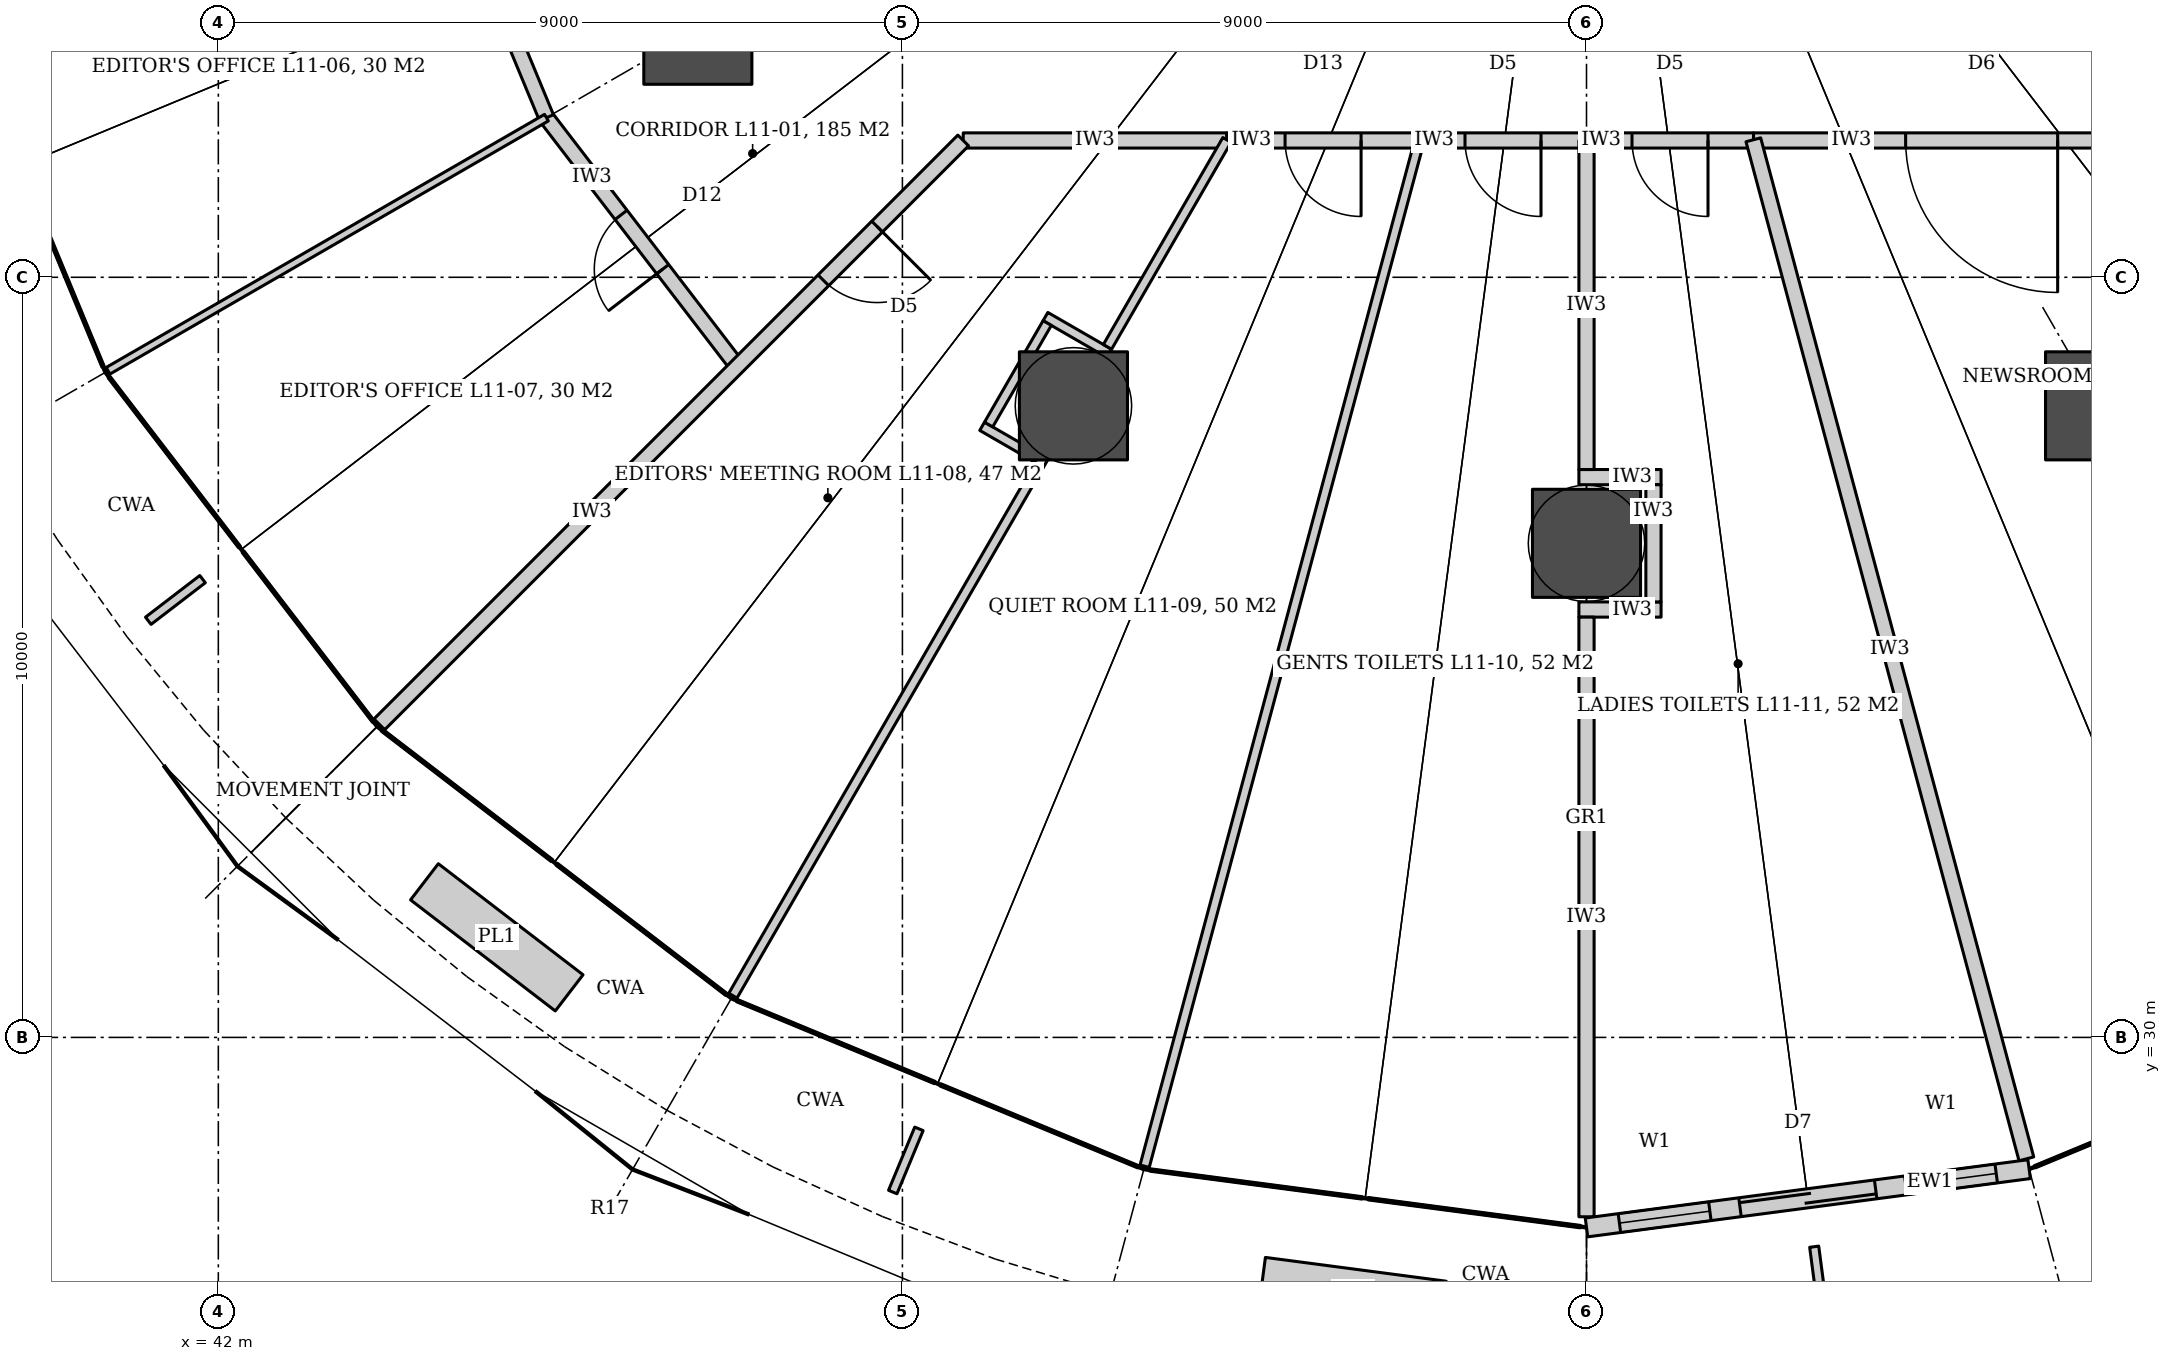
"""IFC4 building model, lengths in metres.
Left out: names, types, materials, properties, quantities, classifications, styles, units other than length and angle.
Written with IfcOpenShell. Run it as: python <this file> out.ifc"""

import sys

from ifc_helpers import new_model, si_unit, direction, frame, frame_2d, origin, origin_2d, place, context, subcontext, project, spatial, rectangle, hollow_circle, extrude, element, fill, save


model = new_model("IFC4")
c1 = context("Model", 3, precision=1e-05, world=origin(), true_north=direction((0.0, 1.0)))
c2 = subcontext(c1, "Body", "Model", "MODEL_VIEW")
j1 = project(units=[si_unit("LENGTHUNIT", "METRE"), si_unit("PLANEANGLEUNIT", "RADIAN")], contexts=[c1])
p1 = place(None, origin())
s1 = spatial("IfcSite", under=j1, at=p1, CompositionType="ELEMENT")
p2 = place(p1, origin())
s2 = spatial("IfcBuilding", under=s1, at=p2, CompositionType="ELEMENT")
p3 = place(p2, frame((0.0, 0.0, 55.4)))
s3 = spatial("IfcBuildingStorey", under=s2, at=p3, CompositionType="ELEMENT", Elevation=55.4)
for number, where, z_axis, x_axis in (
    (1, (48.309, 43.25, 0.0), (0.0, 0.0, 1.0), (1.0, 0.0, 0.0)),
    (2, (53.25, 38.309, 0.0), (0.0, 0.0, 1.0), (1.0, 0.0, 0.0)),
    (3, (60.0, 36.5, 0.0), (0.0, 0.0, 1.0), (1.0, 0.0, 0.0)),
    (4, (66.75, 38.309, 0.0), (0.0, 0.0, 1.0), (1.0, 0.0, 0.0)),
):
    element("IfcColumn", number, at=place(p3, frame(where, z_axis=z_axis, x_axis=x_axis)), inside=s3, PredefinedType="COLUMN", context=c2, shape_type="SweptSolid", body=[
        extrude(hollow_circle(Radius=0.711, WallThickness=0.07, at=origin_2d()), origin(), (0.0, 0.0, 1.0), 4.2),
    ])
p4 = place(p3, frame((48.828, 38.828, 0.0), z_axis=(0.0, 0.0, 1.0), x_axis=(-0.608714823874, 0.793389099494, 0.0)))
e5 = element("IfcWall", 5, at=p4, inside=s3, PredefinedType="PARTITIONING", context=c2, shape_type="SweptSolid", body=[
    extrude(rectangle(XDim=4.125, YDim=0.2, at=frame_2d((2.062, 0.0))), origin(), (0.0, 0.0, 1.0), 3.04),
])
p5 = place(p4, frame((1.612, 0.0, 0.0)))
e6 = element("IfcOpeningElement", 6, at=p5, cuts=e5, PredefinedType="OPENING", context=c2, shape_type="SweptSolid", body=[
    extrude(rectangle(XDim=0.9, YDim=2.4, at=frame_2d((0.45, 1.2))), frame((0.0, 0.11, 0.0), z_axis=(0.0, -1.0, 0.0), x_axis=(1.0, 0.0, 0.0)), (0.0, 0.0, 1.0), 0.22),
])
p6 = place(p3, frame((46.317, 42.1, 0.0), z_axis=(0.0, 0.0, 1.0), x_axis=(-0.382731667114, 0.923859551549, 0.0)))
e7 = element("IfcWall", 7, at=p6, inside=s3, PredefinedType="PARTITIONING", context=c2, shape_type="SweptSolid", body=[
    extrude(rectangle(XDim=4.125, YDim=0.2, at=frame_2d((2.062, 0.0))), origin(), (0.0, 0.0, 1.0), 3.04),
])
p7 = place(p6, frame((1.612, 0.0, 0.0)))
e8 = element("IfcOpeningElement", 8, at=p7, cuts=e7, PredefinedType="OPENING", context=c2, shape_type="SweptSolid", body=[
    extrude(rectangle(XDim=0.9, YDim=2.4, at=frame_2d((0.45, 1.2))), frame((0.0, 0.11, 0.0), z_axis=(0.0, -1.0, 0.0), x_axis=(1.0, 0.0, 0.0)), (0.0, 0.0, 1.0), 0.22),
])
p8 = place(p3, frame((68.2, 41.8, 0.0), z_axis=(0.0, 0.0, 1.0), x_axis=(-1.0, 0.0, 0.0)))
e9 = element("IfcWall", 9, at=p8, inside=s3, PredefinedType="PARTITIONING", context=c2, shape_type="SweptSolid", body=[
    extrude(rectangle(XDim=6.003, YDim=0.2, at=frame_2d((3.001, 0.0))), origin(), (0.0, 0.0, 1.0), 3.04),
])
p9 = place(p8, frame((2.001, 0.0, 0.0)))
e10 = element("IfcOpeningElement", 10, at=p9, cuts=e9, PredefinedType="OPENING", context=c2, shape_type="SweptSolid", body=[
    extrude(rectangle(XDim=2.0, YDim=2.1, at=frame_2d((1.0, 1.05))), frame((0.0, 0.11, 0.0), z_axis=(0.0, -1.0, 0.0), x_axis=(1.0, 0.0, 0.0)), (0.0, 0.0, 1.0), 0.22),
])
p10 = place(p3, frame((62.197, 41.8, 0.0), z_axis=(0.0, 0.0, 1.0), x_axis=(-1.0, 0.0, 0.0)))
e11 = element("IfcWall", 11, at=p10, inside=s3, PredefinedType="PARTITIONING", context=c2, shape_type="SweptSolid", body=[
    extrude(rectangle(XDim=2.197, YDim=0.2, at=frame_2d((1.099, 0.0))), origin(), (0.0, 0.0, 1.0), 3.04),
])
p11 = place(p10, frame((0.599, 0.0, 0.0)))
e12 = element("IfcOpeningElement", 12, at=p11, cuts=e11, PredefinedType="OPENING", context=c2, shape_type="SweptSolid", body=[
    extrude(rectangle(XDim=1.0, YDim=2.1, at=frame_2d((0.5, 1.05))), frame((0.0, 0.11, 0.0), z_axis=(0.0, -1.0, 0.0), x_axis=(1.0, 0.0, 0.0)), (0.0, 0.0, 1.0), 0.22),
])
p12 = place(p3, frame((60.0, 41.8, 0.0), z_axis=(0.0, 0.0, 1.0), x_axis=(-1.0, 0.0, 0.0)))
e13 = element("IfcWall", 13, at=p12, inside=s3, PredefinedType="PARTITIONING", context=c2, shape_type="SweptSolid", body=[
    extrude(rectangle(XDim=2.197, YDim=0.2, at=frame_2d((1.099, 0.0))), origin(), (0.0, 0.0, 1.0), 3.04),
])
p13 = place(p12, frame((0.599, 0.0, 0.0)))
e14 = element("IfcOpeningElement", 14, at=p13, cuts=e13, PredefinedType="OPENING", context=c2, shape_type="SweptSolid", body=[
    extrude(rectangle(XDim=1.0, YDim=2.1, at=frame_2d((0.5, 1.05))), frame((0.0, 0.11, 0.0), z_axis=(0.0, -1.0, 0.0), x_axis=(1.0, 0.0, 0.0)), (0.0, 0.0, 1.0), 0.22),
])
p14 = place(p3, frame((57.803, 41.8, 0.0), z_axis=(0.0, 0.0, 1.0), x_axis=(-1.0, 0.0, 0.0)))
e15 = element("IfcWall", 15, at=p14, inside=s3, PredefinedType="PARTITIONING", context=c2, shape_type="SweptSolid", body=[
    extrude(rectangle(XDim=2.537, YDim=0.2, at=frame_2d((1.269, 0.0))), origin(), (0.0, 0.0, 1.0), 3.04),
])
p15 = place(p14, frame((0.769, 0.0, 0.0)))
e16 = element("IfcOpeningElement", 16, at=p15, cuts=e15, PredefinedType="OPENING", context=c2, shape_type="SweptSolid", body=[
    extrude(rectangle(XDim=1.0, YDim=2.4, at=frame_2d((0.5, 1.2))), frame((0.0, 0.11, 0.0), z_axis=(0.0, -1.0, 0.0), x_axis=(1.0, 0.0, 0.0)), (0.0, 0.0, 1.0), 0.22),
])
p16 = place(p3, frame((55.266, 41.8, 0.0), z_axis=(0.0, 0.0, 1.0), x_axis=(-1.0, 0.0, 0.0)))
e17 = element("IfcWall", 17, at=p16, inside=s3, PredefinedType="PARTITIONING", context=c2, shape_type="SweptSolid", body=[
    extrude(rectangle(XDim=3.466, YDim=0.2, at=frame_2d((1.733, 0.0))), origin(), (0.0, 0.0, 1.0), 3.04),
])
p17 = place(p3, frame((46.317, 42.1, 0.0), z_axis=(0.0, 0.0, 1.0), x_axis=(-0.866023818221, -0.500002746266, 0.0)))
e18 = element("IfcWall", 18, at=p17, inside=s3, PredefinedType="PARTITIONING", context=c2, shape_type="SweptSolid", body=[
    extrude(rectangle(XDim=6.66, YDim=0.1, at=frame_2d((3.33, 0.0))), origin(), (0.0, 0.0, 1.0), 3.04),
])
p18 = place(p3, frame((51.8, 41.8, 0.0), z_axis=(0.0, 0.0, 1.0), x_axis=(-0.707106781187, -0.707106781187, 0.0)))
e19 = element("IfcWall", 19, at=p18, inside=s3, PredefinedType="PARTITIONING", context=c2, shape_type="SweptSolid", body=[
    extrude(rectangle(XDim=10.864, YDim=0.2, at=frame_2d((5.432, 0.0))), origin(), (0.0, 0.0, 1.0), 3.02),
])
p19 = place(p18, frame((1.602, 0.0, 0.0)))
e20 = element("IfcOpeningElement", 20, at=p19, cuts=e19, PredefinedType="OPENING", context=c2, shape_type="SweptSolid", body=[
    extrude(rectangle(XDim=1.0, YDim=2.1, at=frame_2d((0.5, 1.05))), frame((0.0, 0.11, 0.0), z_axis=(0.0, -1.0, 0.0), x_axis=(1.0, 0.0, 0.0)), (0.0, 0.0, 1.0), 0.22),
])
for number, where, z_axis, x_axis in (
    (21, (53.721, 38.999, 0.0), (0.0, 0.0, 1.0), (-0.866, 0.5, 0.0)),
    (22, (52.887, 37.556, 0.0), (0.0, 0.0, 1.0), (-0.866, 0.5, 0.0)),
):
    element("IfcWall", number, at=place(p3, frame(where, z_axis=z_axis, x_axis=x_axis)), inside=s3, PredefinedType="PARTITIONING", context=c2, shape_type="SweptSolid", body=[
        extrude(rectangle(XDim=0.969, YDim=0.125, at=frame_2d((0.484, 0.0))), origin(), (0.0, 0.0, 1.0), 3.02),
    ])
p20 = place(p3, frame((52.905, 39.398, 0.0), z_axis=(0.0, 0.0, 1.0), x_axis=(-0.499987416453, -0.866032668777, 0.0)))
e23 = element("IfcWall", 23, at=p20, inside=s3, PredefinedType="PARTITIONING", context=c2, shape_type="SweptSolid", body=[
    extrude(rectangle(XDim=1.542, YDim=0.125, at=frame_2d((0.771, 0.0))), origin(), (0.0, 0.0, 1.0), 3.02),
])
p21 = place(p3, frame((55.27, 41.807, 0.0), z_axis=(0.0, 0.0, 1.0), x_axis=(-0.500022702249, -0.866012296238, 0.0)))
e24 = element("IfcWall", 24, at=p21, inside=s3, PredefinedType="PARTITIONING", context=c2, shape_type="SweptSolid", body=[
    extrude(rectangle(XDim=3.144, YDim=0.125, at=frame_2d((1.572, 0.0))), origin(), (0.0, 0.0, 1.0), 3.04),
])
p22 = place(p3, frame((52.802, 37.533, 0.0), z_axis=(0.0, 0.0, 1.0), x_axis=(-0.499997628298, -0.866026773083, 0.0)))
e25 = element("IfcWall", 25, at=p22, inside=s3, PredefinedType="PARTITIONING", context=c2, shape_type="SweptSolid", body=[
    extrude(rectangle(XDim=8.064, YDim=0.125, at=frame_2d((4.032, 0.0))), origin(), (0.0, 0.0, 1.0), 3.04),
])
p23 = place(p3, frame((57.805, 41.809, 0.0), z_axis=(0.0, 0.0, 1.0), x_axis=(-0.25881464843, -0.965927004363, 0.0)))
e26 = element("IfcWall", 26, at=p23, inside=s3, PredefinedType="PARTITIONING", context=c2, shape_type="SweptSolid", body=[
    extrude(rectangle(XDim=13.98, YDim=0.125, at=frame_2d((6.99, 0.0))), origin(), (0.0, 0.0, 1.0), 3.02),
])
for number, where, z_axis, x_axis in (
    (27, (59.9, 37.371, 0.0), (0.0, 0.0, 1.0), (1.0, 0.0, 0.0)),
    (28, (59.9, 35.629, 0.0), (0.0, 0.0, 1.0), (1.0, 0.0, 0.0)),
):
    element("IfcWall", number, at=place(p3, frame(where, z_axis=z_axis, x_axis=x_axis)), inside=s3, PredefinedType="PARTITIONING", context=c2, shape_type="SweptSolid", body=[
        extrude(rectangle(XDim=1.081, YDim=0.2, at=frame_2d((0.541, 0.0))), origin(), (0.0, 0.0, 1.0), 3.02),
    ])
p24 = place(p3, frame((60.881, 37.271, 0.0), z_axis=(0.0, 0.0, 1.0), x_axis=(0.0, -1.0, 0.0)))
e29 = element("IfcWall", 29, at=p24, inside=s3, PredefinedType="PARTITIONING", context=c2, shape_type="SweptSolid", body=[
    extrude(rectangle(XDim=1.542, YDim=0.2, at=frame_2d((0.771, 0.0))), origin(), (0.0, 0.0, 1.0), 3.02),
])
p25 = place(p3, frame((60.0, 41.8, 0.0), z_axis=(0.0, 0.0, 1.0), x_axis=(0.0, -1.0, 0.0)))
e30 = element("IfcWall", 30, at=p25, inside=s3, PredefinedType="PARTITIONING", context=c2, shape_type="SweptSolid", body=[
    extrude(rectangle(XDim=4.329, YDim=0.2, at=frame_2d((2.165, 0.0))), origin(), (0.0, 0.0, 1.0), 3.04),
])
p26 = place(p3, frame((60.0, 35.529, 0.0), z_axis=(0.0, 0.0, 1.0), x_axis=(0.0, -1.0, 0.0)))
e31 = element("IfcWall", 31, at=p26, inside=s3, PredefinedType="PARTITIONING", context=c2, shape_type="SweptSolid", body=[
    extrude(rectangle(XDim=7.889, YDim=0.2, at=frame_2d((3.945, 0.0))), origin(), (0.0, 0.0, 1.0), 3.04),
])
p27 = place(p3, frame((62.195, 41.809, 0.0), z_axis=(0.0, 0.0, 1.0), x_axis=(0.258811989868, -0.965927716706, 0.0)))
e32 = element("IfcWall", 32, at=p27, inside=s3, PredefinedType="PARTITIONING", context=c2, shape_type="SweptSolid", body=[
    extrude(rectangle(XDim=13.88, YDim=0.2, at=frame_2d((6.94, 0.0))), origin(), (0.0, 0.0, 1.0), 3.02),
])
p28 = place(p3, frame((60.0, 27.5, 0.0), z_axis=(0.0, 0.0, 1.0), x_axis=(0.991446512747, 0.13051364818, 0.0)))
e33 = element("IfcWall", 33, at=p28, inside=s3, PredefinedType="SOLIDWALL", context=c2, shape_type="SweptSolid", body=[
    extrude(rectangle(XDim=5.874, YDim=0.25, at=frame_2d((2.937, 0.0))), origin(), (0.0, 0.0, 1.0), 4.04),
])
p29 = place(p28, frame((2.037, 0.0, 0.0)))
e34 = element("IfcOpeningElement", 34, at=p29, cuts=e33, PredefinedType="OPENING", context=c2, shape_type="SweptSolid", body=[
    extrude(rectangle(XDim=1.8, YDim=2.4, at=frame_2d((0.9, 1.2))), frame((0.0, 0.135, 0.0), z_axis=(0.0, -1.0, 0.0), x_axis=(1.0, 0.0, 0.0)), (0.0, 0.0, 1.0), 0.27),
])
p30 = place(p28, frame((0.437, 0.0, 0.0)))
e35 = element("IfcOpeningElement", 35, at=p30, cuts=e33, PredefinedType="OPENING", context=c2, shape_type="SweptSolid", body=[
    extrude(rectangle(XDim=1.2, YDim=2.4, at=frame_2d((0.6, 1.2))), frame((0.0, 0.135, 0.0), z_axis=(0.0, -1.0, 0.0), x_axis=(1.0, 0.0, 0.0)), (0.0, 0.0, 1.0), 0.27),
])
p31 = place(p28, frame((4.237, 0.0, 0.0)))
e36 = element("IfcOpeningElement", 36, at=p31, cuts=e33, PredefinedType="OPENING", context=c2, shape_type="SweptSolid", body=[
    extrude(rectangle(XDim=1.2, YDim=2.4, at=frame_2d((0.6, 1.2))), frame((0.0, 0.135, 0.0), z_axis=(0.0, -1.0, 0.0), x_axis=(1.0, 0.0, 0.0)), (0.0, 0.0, 1.0), 0.27),
])
p32 = place(p5, origin())
e37 = element("IfcDoor", 37, at=p32, inside=s3, OperationType="SINGLE_SWING_LEFT", PredefinedType="DOOR", context=c2, shape_type="SweptSolid", body=[
    extrude(rectangle(XDim=0.9, YDim=2.4, at=frame_2d((0.45, 1.2))), frame((0.0, 0.025, 0.0), z_axis=(0.0, -1.0, 0.0), x_axis=(1.0, 0.0, 0.0)), (0.0, 0.0, 1.0), 0.05),
])
fill(e6, e37)
p33 = place(p19, origin())
e38 = element("IfcDoor", 38, at=p33, inside=s3, OperationType="SINGLE_SWING_LEFT", PredefinedType="DOOR", context=c2, shape_type="SweptSolid", body=[
    extrude(rectangle(XDim=1.0, YDim=2.1, at=frame_2d((0.5, 1.05))), frame((0.0, 0.025, 0.0), z_axis=(0.0, -1.0, 0.0), x_axis=(1.0, 0.0, 0.0)), (0.0, 0.0, 1.0), 0.05),
])
fill(e20, e38)
p34 = place(p15, origin())
e39 = element("IfcDoor", 39, at=p34, inside=s3, OperationType="SINGLE_SWING_LEFT", PredefinedType="DOOR", context=c2, shape_type="SweptSolid", body=[
    extrude(rectangle(XDim=1.0, YDim=2.4, at=frame_2d((0.5, 1.2))), frame((0.0, 0.025, 0.0), z_axis=(0.0, -1.0, 0.0), x_axis=(1.0, 0.0, 0.0)), (0.0, 0.0, 1.0), 0.05),
])
fill(e16, e39)
p35 = place(p13, origin())
e40 = element("IfcDoor", 40, at=p35, inside=s3, OperationType="SINGLE_SWING_LEFT", PredefinedType="DOOR", context=c2, shape_type="SweptSolid", body=[
    extrude(rectangle(XDim=1.0, YDim=2.1, at=frame_2d((0.5, 1.05))), frame((0.0, 0.025, 0.0), z_axis=(0.0, -1.0, 0.0), x_axis=(1.0, 0.0, 0.0)), (0.0, 0.0, 1.0), 0.05),
])
fill(e14, e40)
p36 = place(p11, origin())
e41 = element("IfcDoor", 41, at=p36, inside=s3, OperationType="SINGLE_SWING_LEFT", PredefinedType="DOOR", context=c2, shape_type="SweptSolid", body=[
    extrude(rectangle(XDim=1.0, YDim=2.1, at=frame_2d((0.5, 1.05))), frame((0.0, 0.025, 0.0), z_axis=(0.0, -1.0, 0.0), x_axis=(1.0, 0.0, 0.0)), (0.0, 0.0, 1.0), 0.05),
])
fill(e12, e41)
p37 = place(p9, origin())
e42 = element("IfcDoor", 42, at=p37, inside=s3, OperationType="DOUBLE_DOOR_DOUBLE_SWING", PredefinedType="DOOR", context=c2, shape_type="SweptSolid", body=[
    extrude(rectangle(XDim=2.0, YDim=2.1, at=frame_2d((1.0, 1.05))), frame((0.0, 0.025, 0.0), z_axis=(0.0, -1.0, 0.0), x_axis=(1.0, 0.0, 0.0)), (0.0, 0.0, 1.0), 0.05),
])
fill(e10, e42)
p38 = place(p29, origin())
e43 = element("IfcDoor", 43, at=p38, inside=s3, OperationType="DOUBLE_DOOR_SLIDING", PredefinedType="DOOR", context=c2, shape_type="SweptSolid", body=[
    extrude(rectangle(XDim=1.8, YDim=2.4, at=frame_2d((0.9, 1.2))), frame((0.0, 0.025, 0.0), z_axis=(0.0, -1.0, 0.0), x_axis=(1.0, 0.0, 0.0)), (0.0, 0.0, 1.0), 0.05),
])
fill(e34, e43)
p39 = place(p30, origin())
e44 = element("IfcWindow", 44, at=p39, inside=s3, PartitioningType="SINGLE_PANEL", PredefinedType="WINDOW", context=c2, shape_type="SweptSolid", body=[
    extrude(rectangle(XDim=1.2, YDim=2.4, at=frame_2d((0.6, 1.2))), frame((0.0, 0.03, 0.0), z_axis=(0.0, -1.0, 0.0), x_axis=(1.0, 0.0, 0.0)), (0.0, 0.0, 1.0), 0.06),
])
fill(e35, e44)
p40 = place(p31, origin())
e45 = element("IfcWindow", 45, at=p40, inside=s3, PartitioningType="SINGLE_PANEL", PredefinedType="WINDOW", context=c2, shape_type="SweptSolid", body=[
    extrude(rectangle(XDim=1.2, YDim=2.4, at=frame_2d((0.6, 1.2))), frame((0.0, 0.03, 0.0), z_axis=(0.0, -1.0, 0.0), x_axis=(1.0, 0.0, 0.0)), (0.0, 0.0, 1.0), 0.06),
])
fill(e36, e45)
save(model, sys.argv[1])
